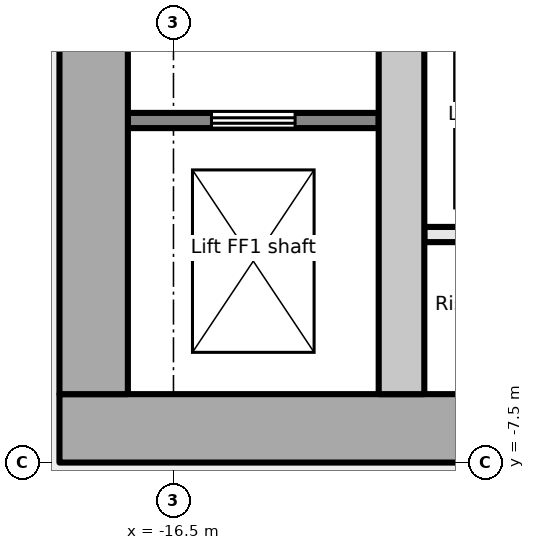
"""IFC4 building model, lengths in metres.
Left out: names, types, materials, properties, quantities, classifications, styles, units other than length and angle.
Written with IfcOpenShell. Run it as: python <this file> out.ifc"""

import sys

from ifc_helpers import new_model, si_unit, direction, frame, frame_2d, origin, place, context, subcontext, project, spatial, rectangle, extrude, element, fill, save


model = new_model("IFC4")
c1 = context("Model", 3, precision=1e-05, world=origin(), true_north=direction((0.0, 1.0)))
c2 = subcontext(c1, "Body", "Model", "MODEL_VIEW")
j1 = project(units=[si_unit("LENGTHUNIT", "METRE"), si_unit("PLANEANGLEUNIT", "RADIAN")], contexts=[c1])
p1 = place(None, origin())
s1 = spatial("IfcSite", under=j1, at=p1, CompositionType="ELEMENT")
p2 = place(p1, origin())
s2 = spatial("IfcBuilding", under=s1, at=p2, CompositionType="ELEMENT")
p3 = place(p2, frame((0.0, 0.0, 120.7)))
s3 = spatial("IfcBuildingStorey", under=s2, at=p3, CompositionType="ELEMENT", Elevation=120.7)
p4 = place(p3, frame((-18.0, -7.05, -0.2), z_axis=(0.0, 0.0, 1.0), x_axis=(1.0, 0.0, 0.0)))
e1 = element("IfcWall", 1, at=p4, inside=s3, PredefinedType="SHEAR", context=c2, shape_type="SweptSolid", body=[
    extrude(rectangle(XDim=36.0, YDim=0.9, at=frame_2d((18.0, 0.0))), origin(), (0.0, 0.0, 1.0), 5.4),
])
p5 = place(p4, frame((7.8, 0.0, 0.2)))
e2 = element("IfcOpeningElement", 2, at=p5, cuts=e1, PredefinedType="OPENING", context=c2, shape_type="SweptSolid", body=[
    extrude(rectangle(XDim=2.4, YDim=2.1, at=frame_2d((1.2, 1.05))), frame((0.0, 0.46, 0.0), z_axis=(0.0, -1.0, 0.0), x_axis=(1.0, 0.0, 0.0)), (0.0, 0.0, 1.0), 0.921),
])
p6 = place(p4, frame((17.4, 0.0, 0.2)))
e3 = element("IfcOpeningElement", 3, at=p6, cuts=e1, PredefinedType="OPENING", context=c2, shape_type="SweptSolid", body=[
    extrude(rectangle(XDim=1.2, YDim=2.1, at=frame_2d((0.6, 1.05))), frame((0.0, 0.46, 0.0), z_axis=(0.0, -1.0, 0.0), x_axis=(1.0, 0.0, 0.0)), (0.0, 0.0, 1.0), 0.921),
])
p7 = place(p4, frame((26.1, 0.0, 0.2)))
e4 = element("IfcOpeningElement", 4, at=p7, cuts=e1, PredefinedType="OPENING", context=c2, shape_type="SweptSolid", body=[
    extrude(rectangle(XDim=2.4, YDim=2.1, at=frame_2d((1.2, 1.05))), frame((0.0, 0.46, 0.0), z_axis=(0.0, -1.0, 0.0), x_axis=(1.0, 0.0, 0.0)), (0.0, 0.0, 1.0), 0.921),
])
p8 = place(p3, frame((-17.55, -6.6, -0.2), z_axis=(0.0, 0.0, 1.0), x_axis=(0.0, 1.0, 0.0)))
e5 = element("IfcWall", 5, at=p8, inside=s3, PredefinedType="SHEAR", context=c2, shape_type="SweptSolid", body=[
    extrude(rectangle(XDim=13.2, YDim=0.9, at=frame_2d((6.6, 0.0))), origin(), (0.0, 0.0, 1.0), 5.4),
])
p9 = place(p8, frame((4.55, 0.0, 0.2)))
e6 = element("IfcOpeningElement", 6, at=p9, cuts=e5, PredefinedType="OPENING", context=c2, shape_type="SweptSolid", body=[
    extrude(rectangle(XDim=1.2, YDim=2.1, at=frame_2d((0.6, 1.05))), frame((0.0, 0.46, 0.0), z_axis=(0.0, -1.0, 0.0), x_axis=(1.0, 0.0, 0.0)), (0.0, 0.0, 1.0), 0.921),
])
p10 = place(p3, frame((-13.5, -6.6, -0.2), z_axis=(0.0, 0.0, 1.0), x_axis=(0.0, 1.0, 0.0)))
e7 = element("IfcWall", 7, at=p10, inside=s3, PredefinedType="SHEAR", context=c2, shape_type="SweptSolid", body=[
    extrude(rectangle(XDim=13.2, YDim=0.6, at=frame_2d((6.6, 0.0))), origin(), (0.0, 0.0, 1.0), 5.4),
])
p11 = place(p3, frame((-17.1, -3.0, 0.0), z_axis=(0.0, 0.0, 1.0), x_axis=(1.0, 0.0, 0.0)))
e8 = element("IfcWall", 8, at=p11, inside=s3, PredefinedType="PARTITIONING", context=c2, shape_type="SweptSolid", body=[
    extrude(rectangle(XDim=3.3, YDim=0.2, at=frame_2d((1.65, 0.0))), origin(), (0.0, 0.0, 1.0), 5.2),
])
p12 = place(p11, frame((1.1, 0.0, 0.0)))
e9 = element("IfcOpeningElement", 9, at=p12, cuts=e8, PredefinedType="OPENING", context=c2, shape_type="SweptSolid", body=[
    extrude(rectangle(XDim=1.1, YDim=2.1, at=frame_2d((0.55, 1.05))), frame((0.0, 0.111, 0.0), z_axis=(0.0, -1.0, 0.0), x_axis=(1.0, 0.0, 0.0)), (0.0, 0.0, 1.0), 0.221),
])
p13 = place(p3, frame((-13.2, -4.5, 0.0), z_axis=(0.0, 0.0, 1.0), x_axis=(1.0, 0.0, 0.0)))
e10 = element("IfcWall", 10, at=p13, inside=s3, PredefinedType="PARTITIONING", context=c2, shape_type="SweptSolid", body=[
    extrude(rectangle(XDim=2.3, YDim=0.2, at=frame_2d((1.15, 0.0))), origin(), (0.0, 0.0, 1.0), 5.2),
])
p14 = place(p12, origin())
e11 = element("IfcDoor", 11, at=p14, inside=s3, OperationType="DOUBLE_DOOR_SLIDING", PredefinedType="DOOR", context=c2, shape_type="SweptSolid", body=[
    extrude(rectangle(XDim=1.1, YDim=2.1, at=frame_2d((0.55, 1.05))), frame((0.0, 0.025, 0.0), z_axis=(0.0, -1.0, 0.0), x_axis=(1.0, 0.0, 0.0)), (0.0, 0.0, 1.0), 0.05),
])
fill(e9, e11)
save(model, sys.argv[1])
